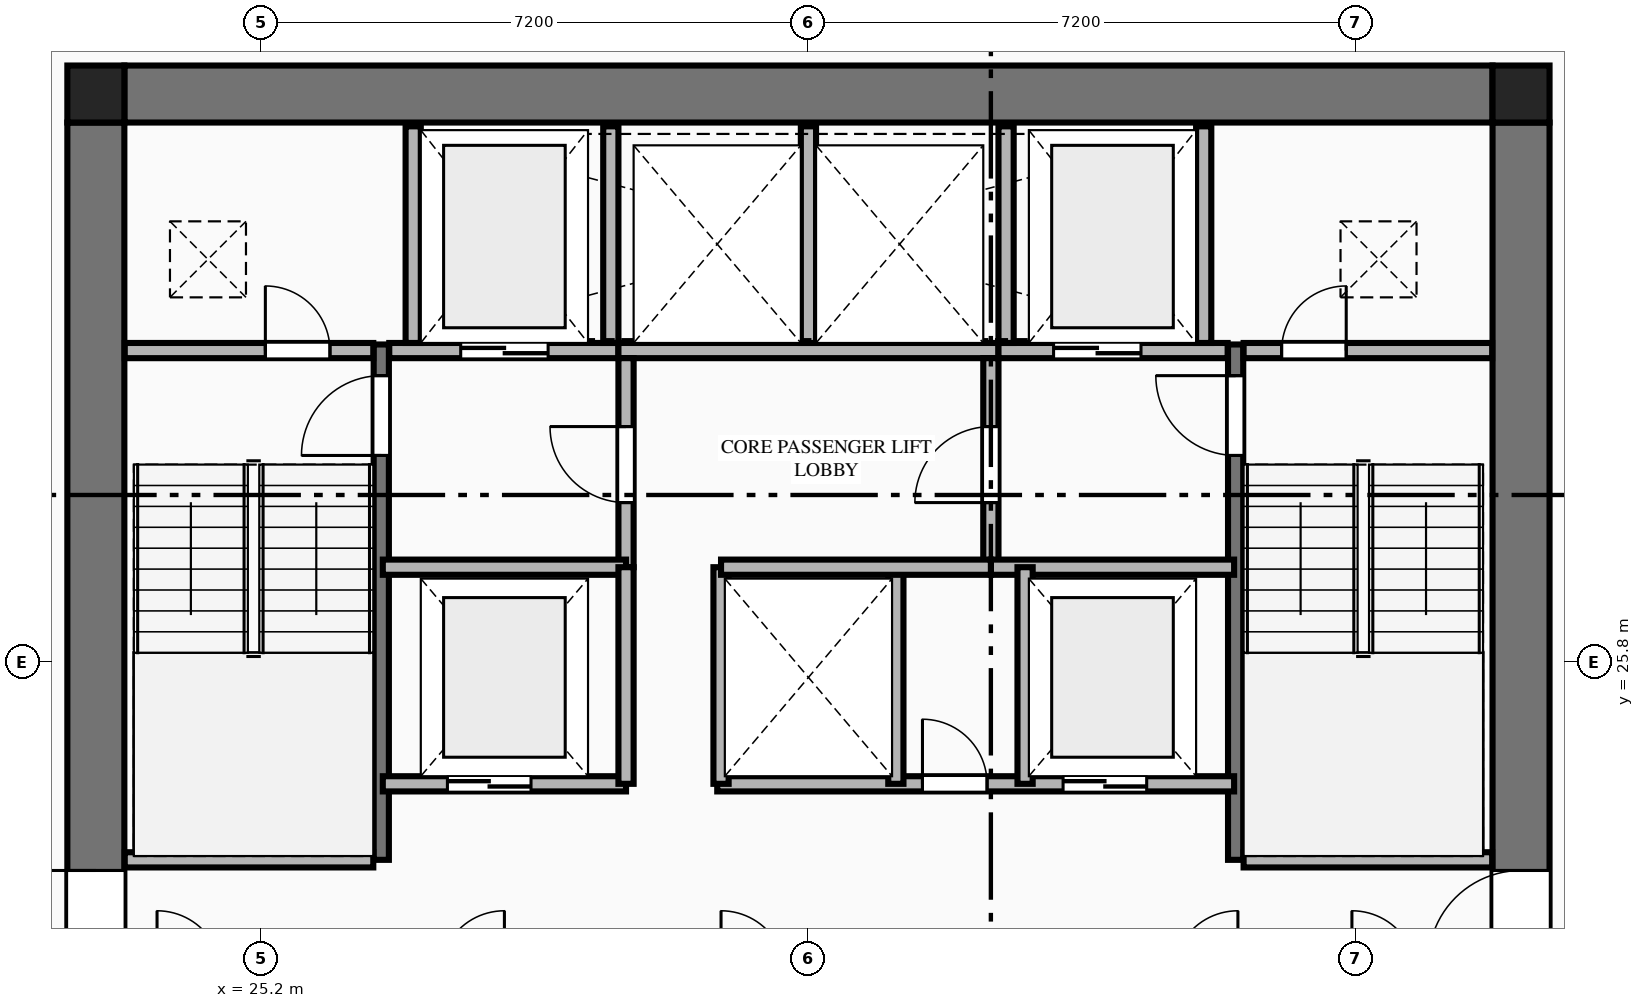
"""IFC4 building model, lengths in metres.
Left out: names, types, materials, properties, quantities, classifications, styles, units other than length and angle.
Written with IfcOpenShell. Run it as: python <this file> out.ifc"""

import sys

from ifc_helpers import new_model, si_unit, direction, frame, frame_2d, origin, origin_2d, place, context, subcontext, project, spatial, rectangle, extrude, element, fill, save


model = new_model("IFC4")
c1 = context("Model", 3, precision=1e-05, world=origin(), true_north=direction((0.0, 1.0)))
c2 = subcontext(c1, "Body", "Model", "MODEL_VIEW")
j1 = project(units=[si_unit("LENGTHUNIT", "METRE"), si_unit("PLANEANGLEUNIT", "RADIAN")], contexts=[c1])
p1 = place(None, origin())
s1 = spatial("IfcSite", under=j1, at=p1, CompositionType="ELEMENT")
p2 = place(p1, origin())
s2 = spatial("IfcBuilding", under=s1, at=p2, CompositionType="ELEMENT")
p3 = place(p2, frame((0.0, 0.0, 119.7)))
s3 = spatial("IfcBuildingStorey", under=s2, at=p3, CompositionType="ELEMENT", Elevation=119.7)
for number, where, z_axis, x_axis in (
    (1, (41.775, 33.275, 0.0), (0.0, 0.0, 1.0), (1.0, 0.0, 0.0)),
    (2, (23.025, 33.275, 0.0), (0.0, 0.0, 1.0), (1.0, 0.0, 0.0)),
):
    element("IfcColumn", number, at=place(p3, frame(where, z_axis=z_axis, x_axis=x_axis)), inside=s3, PredefinedType="COLUMN", context=c2, shape_type="SweptSolid", body=[
        extrude(rectangle(XDim=0.75, YDim=0.75, at=origin_2d()), origin(), (0.0, 0.0, 1.0), 3.55),
    ])
p4 = place(p3, frame((23.4, 33.275, 0.0), z_axis=(0.0, 0.0, 1.0), x_axis=(1.0, 0.0, 0.0)))
e3 = element("IfcWall", 3, at=p4, inside=s3, PredefinedType="SHEAR", context=c2, shape_type="SweptSolid", body=[
    extrude(rectangle(XDim=18.0, YDim=0.75, at=frame_2d((9.0, 0.0))), origin(), (0.0, 0.0, 1.0), 3.34),
])
p5 = place(p3, frame((23.025, 18.9, 0.0), z_axis=(0.0, 0.0, 1.0), x_axis=(0.0, 1.0, 0.0)))
e4 = element("IfcWall", 4, at=p5, inside=s3, PredefinedType="SHEAR", context=c2, shape_type="SweptSolid", body=[
    extrude(rectangle(XDim=14.0, YDim=0.75, at=frame_2d((7.0, 0.0))), origin(), (0.0, 0.0, 1.0), 3.34),
])
p6 = place(p5, frame((2.94, 0.0, 0.0)))
e5 = element("IfcOpeningElement", 5, at=p6, cuts=e4, PredefinedType="OPENING", context=c2, shape_type="SweptSolid", body=[
    extrude(rectangle(XDim=1.22, YDim=2.25, at=frame_2d((0.61, 1.125))), frame((0.0, 0.385, 0.0), z_axis=(0.0, -1.0, 0.0), x_axis=(1.0, 0.0, 0.0)), (0.0, 0.0, 1.0), 0.77),
])
p7 = place(p3, frame((41.775, 18.9, 0.0), z_axis=(0.0, 0.0, 1.0), x_axis=(0.0, 1.0, 0.0)))
e6 = element("IfcWall", 6, at=p7, inside=s3, PredefinedType="SHEAR", context=c2, shape_type="SweptSolid", body=[
    extrude(rectangle(XDim=14.0, YDim=0.75, at=frame_2d((7.0, 0.0))), origin(), (0.0, 0.0, 1.0), 3.34),
])
p8 = place(p7, frame((2.94, 0.0, 0.0)))
e7 = element("IfcOpeningElement", 7, at=p8, cuts=e6, PredefinedType="OPENING", context=c2, shape_type="SweptSolid", body=[
    extrude(rectangle(XDim=1.22, YDim=2.25, at=frame_2d((0.61, 1.125))), frame((0.0, 0.385, 0.0), z_axis=(0.0, -1.0, 0.0), x_axis=(1.0, 0.0, 0.0)), (0.0, 0.0, 1.0), 0.77),
])
p9 = place(p3, frame((26.78, 23.2, 0.0), z_axis=(0.0, 0.0, 1.0), x_axis=(0.0, 1.0, 0.0)))
e8 = element("IfcWall", 8, at=p9, inside=s3, PredefinedType="SHEAR", context=c2, shape_type="SweptSolid", body=[
    extrude(rectangle(XDim=6.78, YDim=0.2, at=frame_2d((3.39, 0.0))), origin(), (0.0, 0.0, 1.0), 3.55),
])
p10 = place(p9, frame((5.32, 0.0, 0.0)))
e9 = element("IfcOpeningElement", 9, at=p10, cuts=e8, PredefinedType="OPENING", context=c2, shape_type="SweptSolid", body=[
    extrude(rectangle(XDim=1.05, YDim=2.15, at=frame_2d((0.525, 1.075))), frame((0.0, 0.11, 0.0), z_axis=(0.0, -1.0, 0.0), x_axis=(1.0, 0.0, 0.0)), (0.0, 0.0, 1.0), 0.22),
])
p11 = place(p3, frame((23.405, 23.2, 0.0), z_axis=(0.0, 0.0, 1.0), x_axis=(1.0, 0.0, 0.0)))
e10 = element("IfcWall", 10, at=p11, inside=s3, PredefinedType="PLUMBINGWALL", context=c2, shape_type="SweptSolid", body=[
    extrude(rectangle(XDim=3.27, YDim=0.2, at=frame_2d((1.635, 0.0))), origin(), (0.0, 0.0, 1.0), 3.34),
])
p12 = place(p3, frame((38.02, 23.2, 0.0), z_axis=(0.0, 0.0, 1.0), x_axis=(0.0, 1.0, 0.0)))
e11 = element("IfcWall", 11, at=p12, inside=s3, PredefinedType="SHEAR", context=c2, shape_type="SweptSolid", body=[
    extrude(rectangle(XDim=6.78, YDim=0.2, at=frame_2d((3.39, 0.0))), origin(), (0.0, 0.0, 1.0), 3.55),
])
p13 = place(p12, frame((5.32, 0.0, 0.0)))
e12 = element("IfcOpeningElement", 12, at=p13, cuts=e11, PredefinedType="OPENING", context=c2, shape_type="SweptSolid", body=[
    extrude(rectangle(XDim=1.05, YDim=2.15, at=frame_2d((0.525, 1.075))), frame((0.0, 0.11, 0.0), z_axis=(0.0, -1.0, 0.0), x_axis=(1.0, 0.0, 0.0)), (0.0, 0.0, 1.0), 0.22),
])
p14 = place(p3, frame((38.125, 23.2, 0.0), z_axis=(0.0, 0.0, 1.0), x_axis=(1.0, 0.0, 0.0)))
e13 = element("IfcWall", 13, at=p14, inside=s3, PredefinedType="PLUMBINGWALL", context=c2, shape_type="SweptSolid", body=[
    extrude(rectangle(XDim=3.27, YDim=0.2, at=frame_2d((1.635, 0.0))), origin(), (0.0, 0.0, 1.0), 3.34),
])
p15 = place(p3, frame((23.405, 29.9, 0.0), z_axis=(0.0, 0.0, 1.0), x_axis=(1.0, 0.0, 0.0)))
e14 = element("IfcWall", 14, at=p15, inside=s3, PredefinedType="PLUMBINGWALL", context=c2, shape_type="SweptSolid", body=[
    extrude(rectangle(XDim=3.27, YDim=0.2, at=frame_2d((1.635, 0.0))), origin(), (0.0, 0.0, 1.0), 3.34),
])
p16 = place(p15, frame((1.85, 0.0, 0.0)))
e15 = element("IfcOpeningElement", 15, at=p16, cuts=e14, PredefinedType="OPENING", context=c2, shape_type="SweptSolid", body=[
    extrude(rectangle(XDim=0.85, YDim=2.05, at=frame_2d((0.425, 1.025))), frame((0.0, 0.11, 0.0), z_axis=(0.0, -1.0, 0.0), x_axis=(1.0, 0.0, 0.0)), (0.0, 0.0, 1.0), 0.22),
])
p17 = place(p3, frame((26.885, 29.9, 0.0), z_axis=(0.0, 0.0, 1.0), x_axis=(1.0, 0.0, 0.0)))
e16 = element("IfcWall", 16, at=p17, inside=s3, PredefinedType="PLUMBINGWALL", context=c2, shape_type="SweptSolid", body=[
    extrude(rectangle(XDim=3.015, YDim=0.2, at=frame_2d((1.507, 0.0))), origin(), (0.0, 0.0, 1.0), 3.34),
])
p18 = place(p17, frame((0.94, 0.0, 0.0)))
e17 = element("IfcOpeningElement", 17, at=p18, cuts=e16, PredefinedType="OPENING", context=c2, shape_type="SweptSolid", body=[
    extrude(rectangle(XDim=1.15, YDim=2.2, at=frame_2d((0.575, 1.1))), frame((0.0, 0.11, 0.0), z_axis=(0.0, -1.0, 0.0), x_axis=(1.0, 0.0, 0.0)), (0.0, 0.0, 1.0), 0.22),
])
p19 = place(p3, frame((29.9, 29.9, 0.0), z_axis=(0.0, 0.0, 1.0), x_axis=(1.0, 0.0, 0.0)))
e18 = element("IfcWall", 18, at=p19, inside=s3, PredefinedType="PLUMBINGWALL", context=c2, shape_type="SweptSolid", body=[
    extrude(rectangle(XDim=5.0, YDim=0.2, at=frame_2d((2.5, 0.0))), origin(), (0.0, 0.0, 1.0), 3.34),
])
p20 = place(p3, frame((34.9, 29.9, 0.0), z_axis=(0.0, 0.0, 1.0), x_axis=(1.0, 0.0, 0.0)))
e19 = element("IfcWall", 19, at=p20, inside=s3, PredefinedType="PLUMBINGWALL", context=c2, shape_type="SweptSolid", body=[
    extrude(rectangle(XDim=3.015, YDim=0.2, at=frame_2d((1.508, 0.0))), origin(), (0.0, 0.0, 1.0), 3.34),
])
p21 = place(p20, frame((0.725, 0.0, 0.0)))
e20 = element("IfcOpeningElement", 20, at=p21, cuts=e19, PredefinedType="OPENING", context=c2, shape_type="SweptSolid", body=[
    extrude(rectangle(XDim=1.15, YDim=2.2, at=frame_2d((0.575, 1.1))), frame((0.0, 0.11, 0.0), z_axis=(0.0, -1.0, 0.0), x_axis=(1.0, 0.0, 0.0)), (0.0, 0.0, 1.0), 0.22),
])
p22 = place(p3, frame((38.125, 29.9, 0.0), z_axis=(0.0, 0.0, 1.0), x_axis=(1.0, 0.0, 0.0)))
e21 = element("IfcWall", 21, at=p22, inside=s3, PredefinedType="PLUMBINGWALL", context=c2, shape_type="SweptSolid", body=[
    extrude(rectangle(XDim=3.27, YDim=0.2, at=frame_2d((1.635, 0.0))), origin(), (0.0, 0.0, 1.0), 3.34),
])
p23 = place(p22, frame((0.5, 0.0, 0.0)))
e22 = element("IfcOpeningElement", 22, at=p23, cuts=e21, PredefinedType="OPENING", context=c2, shape_type="SweptSolid", body=[
    extrude(rectangle(XDim=0.85, YDim=2.05, at=frame_2d((0.425, 1.025))), frame((0.0, 0.11, 0.0), z_axis=(0.0, -1.0, 0.0), x_axis=(1.0, 0.0, 0.0)), (0.0, 0.0, 1.0), 0.22),
])
for number, where, z_axis, x_axis in (
    (23, (27.2, 30.0, 0.0), (0.0, 0.0, 1.0), (0.0, 1.0, 0.0)),
    (24, (29.8, 30.0, 0.0), (0.0, 0.0, 1.0), (0.0, 1.0, 0.0)),
    (25, (32.4, 30.0, 0.0), (0.0, 0.0, 1.0), (0.0, 1.0, 0.0)),
    (26, (35.0, 30.0, 0.0), (0.0, 0.0, 1.0), (0.0, 1.0, 0.0)),
    (27, (37.6, 30.0, 0.0), (0.0, 0.0, 1.0), (0.0, 1.0, 0.0)),
):
    element("IfcWall", number, at=place(p3, frame(where, z_axis=z_axis, x_axis=x_axis)), inside=s3, PredefinedType="PLUMBINGWALL", context=c2, shape_type="SweptSolid", body=[
        extrude(rectangle(XDim=2.85, YDim=0.2, at=frame_2d((1.425, 0.0))), origin(), (0.0, 0.0, 1.0), 3.34),
    ])
p24 = place(p3, frame((30.0, 27.05, 0.0), z_axis=(0.0, 0.0, 1.0), x_axis=(0.0, 1.0, 0.0)))
e28 = element("IfcWall", 28, at=p24, inside=s3, PredefinedType="PLUMBINGWALL", context=c2, shape_type="SweptSolid", body=[
    extrude(rectangle(XDim=2.75, YDim=0.2, at=frame_2d((1.375, 0.0))), origin(), (0.0, 0.0, 1.0), 3.34),
])
p25 = place(p24, frame((0.85, 0.0, 0.0)))
e29 = element("IfcOpeningElement", 29, at=p25, cuts=e28, PredefinedType="OPENING", context=c2, shape_type="SweptSolid", body=[
    extrude(rectangle(XDim=1.0, YDim=2.15, at=frame_2d((0.5, 1.075))), frame((0.0, 0.11, 0.0), z_axis=(0.0, -1.0, 0.0), x_axis=(1.0, 0.0, 0.0)), (0.0, 0.0, 1.0), 0.22),
])
p26 = place(p3, frame((26.8, 27.05, 0.0), z_axis=(0.0, 0.0, 1.0), x_axis=(1.0, 0.0, 0.0)))
e30 = element("IfcWall", 30, at=p26, inside=s3, PredefinedType="PLUMBINGWALL", context=c2, shape_type="SweptSolid", body=[
    extrude(rectangle(XDim=3.2, YDim=0.2, at=frame_2d((1.6, 0.0))), origin(), (0.0, 0.0, 1.0), 3.34),
])
p27 = place(p3, frame((34.8, 27.05, 0.0), z_axis=(0.0, 0.0, 1.0), x_axis=(0.0, 1.0, 0.0)))
e31 = element("IfcWall", 31, at=p27, inside=s3, PredefinedType="PLUMBINGWALL", context=c2, shape_type="SweptSolid", body=[
    extrude(rectangle(XDim=2.75, YDim=0.2, at=frame_2d((1.375, 0.0))), origin(), (0.0, 0.0, 1.0), 3.34),
])
p28 = place(p27, frame((0.85, 0.0, 0.0)))
e32 = element("IfcOpeningElement", 32, at=p28, cuts=e31, PredefinedType="OPENING", context=c2, shape_type="SweptSolid", body=[
    extrude(rectangle(XDim=1.0, YDim=2.15, at=frame_2d((0.5, 1.075))), frame((0.0, 0.11, 0.0), z_axis=(0.0, -1.0, 0.0), x_axis=(1.0, 0.0, 0.0)), (0.0, 0.0, 1.0), 0.22),
])
p29 = place(p3, frame((34.8, 27.05, 0.0), z_axis=(0.0, 0.0, 1.0), x_axis=(1.0, 0.0, 0.0)))
e33 = element("IfcWall", 33, at=p29, inside=s3, PredefinedType="PLUMBINGWALL", context=c2, shape_type="SweptSolid", body=[
    extrude(rectangle(XDim=3.2, YDim=0.2, at=frame_2d((1.6, 0.0))), origin(), (0.0, 0.0, 1.0), 3.34),
])
p30 = place(p3, frame((26.8, 24.2, 0.0), z_axis=(0.0, 0.0, 1.0), x_axis=(1.0, 0.0, 0.0)))
e34 = element("IfcWall", 34, at=p30, inside=s3, PredefinedType="PLUMBINGWALL", context=c2, shape_type="SweptSolid", body=[
    extrude(rectangle(XDim=3.2, YDim=0.2, at=frame_2d((1.6, 0.0))), origin(), (0.0, 0.0, 1.0), 3.34),
])
p31 = place(p30, frame((0.85, 0.0, 0.0)))
e35 = element("IfcOpeningElement", 35, at=p31, cuts=e34, PredefinedType="OPENING", context=c2, shape_type="SweptSolid", body=[
    extrude(rectangle(XDim=1.1, YDim=2.2, at=frame_2d((0.55, 1.1))), frame((0.0, 0.11, 0.0), z_axis=(0.0, -1.0, 0.0), x_axis=(1.0, 0.0, 0.0)), (0.0, 0.0, 1.0), 0.22),
])
p32 = place(p3, frame((30.0, 24.2, 0.0), z_axis=(0.0, 0.0, 1.0), x_axis=(0.0, 1.0, 0.0)))
e36 = element("IfcWall", 36, at=p32, inside=s3, PredefinedType="PLUMBINGWALL", context=c2, shape_type="SweptSolid", body=[
    extrude(rectangle(XDim=2.85, YDim=0.2, at=frame_2d((1.425, 0.0))), origin(), (0.0, 0.0, 1.0), 3.34),
])
p33 = place(p3, frame((31.2, 24.2, 0.0), z_axis=(0.0, 0.0, 1.0), x_axis=(1.0, 0.0, 0.0)))
e37 = element("IfcWall", 37, at=p33, inside=s3, PredefinedType="PLUMBINGWALL", context=c2, shape_type="SweptSolid", body=[
    extrude(rectangle(XDim=6.8, YDim=0.2, at=frame_2d((3.4, 0.0))), origin(), (0.0, 0.0, 1.0), 3.34),
])
p34 = place(p33, frame((2.7, 0.0, 0.0)))
e38 = element("IfcOpeningElement", 38, at=p34, cuts=e37, PredefinedType="OPENING", context=c2, shape_type="SweptSolid", body=[
    extrude(rectangle(XDim=0.85, YDim=2.05, at=frame_2d((0.425, 1.025))), frame((0.0, 0.11, 0.0), z_axis=(0.0, -1.0, 0.0), x_axis=(1.0, 0.0, 0.0)), (0.0, 0.0, 1.0), 0.22),
])
p35 = place(p33, frame((4.55, 0.0, 0.0)))
e39 = element("IfcOpeningElement", 39, at=p35, cuts=e37, PredefinedType="OPENING", context=c2, shape_type="SweptSolid", body=[
    extrude(rectangle(XDim=1.1, YDim=2.2, at=frame_2d((0.55, 1.1))), frame((0.0, 0.11, 0.0), z_axis=(0.0, -1.0, 0.0), x_axis=(1.0, 0.0, 0.0)), (0.0, 0.0, 1.0), 0.22),
])
for number, where, z_axis, x_axis in (
    (40, (31.25, 24.2, 0.0), (0.0, 0.0, 1.0), (0.0, 1.0, 0.0)),
    (41, (33.55, 24.2, 0.0), (0.0, 0.0, 1.0), (0.0, 1.0, 0.0)),
    (42, (35.25, 24.2, 0.0), (0.0, 0.0, 1.0), (0.0, 1.0, 0.0)),
):
    element("IfcWall", number, at=place(p3, frame(where, z_axis=z_axis, x_axis=x_axis)), inside=s3, PredefinedType="PLUMBINGWALL", context=c2, shape_type="SweptSolid", body=[
        extrude(rectangle(XDim=2.85, YDim=0.2, at=frame_2d((1.425, 0.0))), origin(), (0.0, 0.0, 1.0), 3.34),
    ])
p36 = place(p3, frame((31.25, 27.05, 0.0), z_axis=(0.0, 0.0, 1.0), x_axis=(1.0, 0.0, 0.0)))
e43 = element("IfcWall", 43, at=p36, inside=s3, PredefinedType="PLUMBINGWALL", context=c2, shape_type="SweptSolid", body=[
    extrude(rectangle(XDim=3.55, YDim=0.2, at=frame_2d((1.775, 0.0))), origin(), (0.0, 0.0, 1.0), 3.34),
])
p37 = place(p6, origin())
e44 = element("IfcDoor", 44, at=p37, inside=s3, OperationType="SINGLE_SWING_RIGHT", PredefinedType="DOOR", context=c2, shape_type="SweptSolid", body=[
    extrude(rectangle(XDim=1.22, YDim=2.25, at=frame_2d((0.61, 1.125))), frame((0.0, 0.025, 0.0), z_axis=(0.0, -1.0, 0.0), x_axis=(1.0, 0.0, 0.0)), (0.0, 0.0, 1.0), 0.05),
])
fill(e5, e44)
p38 = place(p8, origin())
e45 = element("IfcDoor", 45, at=p38, inside=s3, OperationType="SINGLE_SWING_LEFT", PredefinedType="DOOR", context=c2, shape_type="SweptSolid", body=[
    extrude(rectangle(XDim=1.22, YDim=2.25, at=frame_2d((0.61, 1.125))), frame((0.0, 0.025, 0.0), z_axis=(0.0, -1.0, 0.0), x_axis=(1.0, 0.0, 0.0)), (0.0, 0.0, 1.0), 0.05),
])
fill(e7, e45)
p39 = place(p10, origin())
e46 = element("IfcDoor", 46, at=p39, inside=s3, OperationType="SINGLE_SWING_LEFT", PredefinedType="DOOR", context=c2, shape_type="SweptSolid", body=[
    extrude(rectangle(XDim=1.05, YDim=2.15, at=frame_2d((0.525, 1.075))), frame((0.0, 0.025, 0.0), z_axis=(0.0, -1.0, 0.0), x_axis=(1.0, 0.0, 0.0)), (0.0, 0.0, 1.0), 0.05),
])
fill(e9, e46)
p40 = place(p13, origin())
e47 = element("IfcDoor", 47, at=p40, inside=s3, OperationType="SINGLE_SWING_RIGHT", PredefinedType="DOOR", context=c2, shape_type="SweptSolid", body=[
    extrude(rectangle(XDim=1.05, YDim=2.15, at=frame_2d((0.525, 1.075))), frame((0.0, 0.025, 0.0), z_axis=(0.0, -1.0, 0.0), x_axis=(1.0, 0.0, 0.0)), (0.0, 0.0, 1.0), 0.05),
])
fill(e12, e47)
p41 = place(p16, origin())
e48 = element("IfcDoor", 48, at=p41, inside=s3, OperationType="SINGLE_SWING_LEFT", PredefinedType="DOOR", context=c2, shape_type="SweptSolid", body=[
    extrude(rectangle(XDim=0.85, YDim=2.05, at=frame_2d((0.425, 1.025))), frame((0.0, 0.025, 0.0), z_axis=(0.0, -1.0, 0.0), x_axis=(1.0, 0.0, 0.0)), (0.0, 0.0, 1.0), 0.05),
])
fill(e15, e48)
p42 = place(p23, origin())
e49 = element("IfcDoor", 49, at=p42, inside=s3, OperationType="SINGLE_SWING_RIGHT", PredefinedType="DOOR", context=c2, shape_type="SweptSolid", body=[
    extrude(rectangle(XDim=0.85, YDim=2.05, at=frame_2d((0.425, 1.025))), frame((0.0, 0.025, 0.0), z_axis=(0.0, -1.0, 0.0), x_axis=(1.0, 0.0, 0.0)), (0.0, 0.0, 1.0), 0.05),
])
fill(e22, e49)
p43 = place(p18, origin())
e50 = element("IfcDoor", 50, at=p43, inside=s3, OperationType="DOUBLE_DOOR_SLIDING", PredefinedType="DOOR", context=c2, shape_type="SweptSolid", body=[
    extrude(rectangle(XDim=1.15, YDim=2.2, at=frame_2d((0.575, 1.1))), frame((0.0, 0.025, 0.0), z_axis=(0.0, -1.0, 0.0), x_axis=(1.0, 0.0, 0.0)), (0.0, 0.0, 1.0), 0.05),
])
fill(e17, e50)
p44 = place(p21, origin())
e51 = element("IfcDoor", 51, at=p44, inside=s3, OperationType="DOUBLE_DOOR_SLIDING", PredefinedType="DOOR", context=c2, shape_type="SweptSolid", body=[
    extrude(rectangle(XDim=1.15, YDim=2.2, at=frame_2d((0.575, 1.1))), frame((0.0, 0.025, 0.0), z_axis=(0.0, -1.0, 0.0), x_axis=(1.0, 0.0, 0.0)), (0.0, 0.0, 1.0), 0.05),
])
fill(e20, e51)
p45 = place(p25, origin())
e52 = element("IfcDoor", 52, at=p45, inside=s3, OperationType="SINGLE_SWING_RIGHT", PredefinedType="DOOR", context=c2, shape_type="SweptSolid", body=[
    extrude(rectangle(XDim=1.0, YDim=2.15, at=frame_2d((0.5, 1.075))), frame((0.0, 0.025, 0.0), z_axis=(0.0, -1.0, 0.0), x_axis=(1.0, 0.0, 0.0)), (0.0, 0.0, 1.0), 0.05),
])
fill(e29, e52)
p46 = place(p28, origin())
e53 = element("IfcDoor", 53, at=p46, inside=s3, OperationType="SINGLE_SWING_LEFT", PredefinedType="DOOR", context=c2, shape_type="SweptSolid", body=[
    extrude(rectangle(XDim=1.0, YDim=2.15, at=frame_2d((0.5, 1.075))), frame((0.0, 0.025, 0.0), z_axis=(0.0, -1.0, 0.0), x_axis=(1.0, 0.0, 0.0)), (0.0, 0.0, 1.0), 0.05),
])
fill(e32, e53)
p47 = place(p31, origin())
e54 = element("IfcDoor", 54, at=p47, inside=s3, OperationType="DOUBLE_DOOR_SLIDING", PredefinedType="DOOR", context=c2, shape_type="SweptSolid", body=[
    extrude(rectangle(XDim=1.1, YDim=2.2, at=frame_2d((0.55, 1.1))), frame((0.0, 0.025, 0.0), z_axis=(0.0, -1.0, 0.0), x_axis=(1.0, 0.0, 0.0)), (0.0, 0.0, 1.0), 0.05),
])
fill(e35, e54)
p48 = place(p34, origin())
e55 = element("IfcDoor", 55, at=p48, inside=s3, OperationType="SINGLE_SWING_LEFT", PredefinedType="DOOR", context=c2, shape_type="SweptSolid", body=[
    extrude(rectangle(XDim=0.85, YDim=2.05, at=frame_2d((0.425, 1.025))), frame((0.0, 0.025, 0.0), z_axis=(0.0, -1.0, 0.0), x_axis=(1.0, 0.0, 0.0)), (0.0, 0.0, 1.0), 0.05),
])
fill(e38, e55)
p49 = place(p35, origin())
e56 = element("IfcDoor", 56, at=p49, inside=s3, OperationType="DOUBLE_DOOR_SLIDING", PredefinedType="DOOR", context=c2, shape_type="SweptSolid", body=[
    extrude(rectangle(XDim=1.1, YDim=2.2, at=frame_2d((0.55, 1.1))), frame((0.0, 0.025, 0.0), z_axis=(0.0, -1.0, 0.0), x_axis=(1.0, 0.0, 0.0)), (0.0, 0.0, 1.0), 0.05),
])
fill(e39, e56)
save(model, sys.argv[1])
